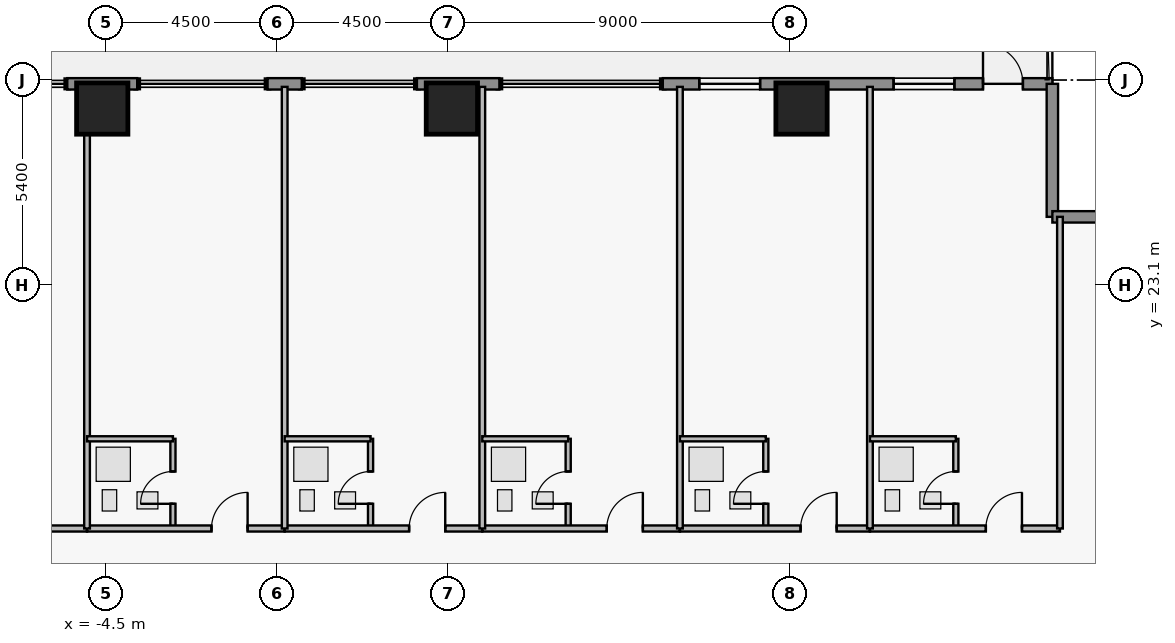
"""IFC4 building model, lengths in metres.
Left out: names, types, materials, properties, quantities, classifications, styles, units other than length and angle.
Written with IfcOpenShell. Run it as: python <this file> out.ifc"""

import sys

from ifc_helpers import new_model, si_unit, direction, frame, frame_2d, origin, origin_2d, place, context, subcontext, project, spatial, rectangle, extrude, element, fill, save


model = new_model("IFC4")
c1 = context("Model", 3, precision=1e-05, world=origin(), true_north=direction((0.0, 1.0)))
c2 = subcontext(c1, "Body", "Model", "MODEL_VIEW")
j1 = project(units=[si_unit("LENGTHUNIT", "METRE"), si_unit("PLANEANGLEUNIT", "RADIAN")], contexts=[c1])
p1 = place(None, origin())
s1 = spatial("IfcSite", under=j1, at=p1, CompositionType="ELEMENT")
p2 = place(p1, origin())
s2 = spatial("IfcBuilding", under=s1, at=p2, CompositionType="ELEMENT")
p3 = place(p2, frame((0.0, 0.0, 110.25)))
s3 = spatial("IfcBuildingStorey", under=s2, at=p3, CompositionType="ELEMENT", Elevation=110.25)
for number, where, z_axis, x_axis in (
    (1, (-4.6, 27.75, 0.0), (0.0, 0.0, 1.0), (1.0, 0.0, 0.0)),
    (2, (4.6, 27.75, 0.0), (0.0, 0.0, 1.0), (1.0, 0.0, 0.0)),
    (3, (13.8, 27.75, 0.0), (0.0, 0.0, 1.0), (1.0, 0.0, 0.0)),
):
    element("IfcColumn", number, at=place(p3, frame(where, z_axis=z_axis, x_axis=x_axis)), inside=s3, PredefinedType="COLUMN", context=c2, shape_type="SweptSolid", body=[
        extrude(rectangle(XDim=1.35, YDim=1.35, at=origin_2d()), origin(), (0.0, 0.0, 1.0), 3.65),
    ])
p4 = place(p3, frame((-5.52, 28.4, 0.0), z_axis=(0.0, 0.0, 1.0), x_axis=(1.0, 0.0, 0.0)))
e4 = element("IfcWall", 4, at=p4, inside=s3, PredefinedType="STANDARD", context=c2, shape_type="SweptSolid", body=[
    extrude(rectangle(XDim=1.84, YDim=0.3, at=frame_2d((0.92, 0.0))), origin(), (0.0, 0.0, 1.0), 3.43),
])
p5 = place(p3, frame((-0.25, 28.4, 0.0), z_axis=(0.0, 0.0, 1.0), x_axis=(1.0, 0.0, 0.0)))
e5 = element("IfcWall", 5, at=p5, inside=s3, PredefinedType="STANDARD", context=c2, shape_type="SweptSolid", body=[
    extrude(rectangle(XDim=0.9, YDim=0.3, at=frame_2d((0.45, 0.0))), origin(), (0.0, 0.0, 1.0), 3.43),
])
p6 = place(p3, frame((3.68, 28.4, 0.0), z_axis=(0.0, 0.0, 1.0), x_axis=(1.0, 0.0, 0.0)))
e6 = element("IfcWall", 6, at=p6, inside=s3, PredefinedType="STANDARD", context=c2, shape_type="SweptSolid", body=[
    extrude(rectangle(XDim=2.17, YDim=0.3, at=frame_2d((1.085, 0.0))), origin(), (0.0, 0.0, 1.0), 3.43),
])
p7 = place(p3, frame((10.15, 28.4, 0.0), z_axis=(0.0, 0.0, 1.0), x_axis=(1.0, 0.0, 0.0)))
e7 = element("IfcWall", 7, at=p7, inside=s3, PredefinedType="STANDARD", context=c2, shape_type="SweptSolid", body=[
    extrude(rectangle(XDim=10.25, YDim=0.3, at=frame_2d((5.125, 0.0))), origin(), (0.0, 0.0, 1.0), 3.43),
])
p8 = place(p7, frame((8.425, 0.0, 0.0)))
e8 = element("IfcOpeningElement", 8, at=p8, cuts=e7, PredefinedType="OPENING", context=c2, shape_type="SweptSolid", body=[
    extrude(rectangle(XDim=1.05, YDim=2.2, at=frame_2d((0.525, 1.1))), frame((0.0, 0.16, 0.0), z_axis=(0.0, -1.0, 0.0), x_axis=(1.0, 0.0, 0.0)), (0.0, 0.0, 1.0), 0.32),
])
p9 = place(p7, frame((0.96, 0.0, 0.85)))
e9 = element("IfcOpeningElement", 9, at=p9, cuts=e7, PredefinedType="OPENING", context=c2, shape_type="SweptSolid", body=[
    extrude(rectangle(XDim=1.6, YDim=1.8, at=frame_2d((0.8, 0.9))), frame((0.0, 0.16, 0.0), z_axis=(0.0, -1.0, 0.0), x_axis=(1.0, 0.0, 0.0)), (0.0, 0.0, 1.0), 0.32),
])
p10 = place(p7, frame((6.073, 0.0, 0.85)))
e10 = element("IfcOpeningElement", 10, at=p10, cuts=e7, PredefinedType="OPENING", context=c2, shape_type="SweptSolid", body=[
    extrude(rectangle(XDim=1.6, YDim=1.8, at=frame_2d((0.8, 0.9))), frame((0.0, 0.16, 0.0), z_axis=(0.0, -1.0, 0.0), x_axis=(1.0, 0.0, 0.0)), (0.0, 0.0, 1.0), 0.32),
])
for number, where, z_axis, x_axis in (
    (11, (20.4, 28.4, 0.0), (0.0, 0.0, 1.0), (0.0, -1.0, 0.0)),
    (12, (20.4, 24.9, 0.0), (0.0, 0.0, 1.0), (1.0, 0.0, 0.0)),
):
    element("IfcWall", number, at=place(p3, frame(where, z_axis=z_axis, x_axis=x_axis)), inside=s3, PredefinedType="STANDARD", context=c2, shape_type="SweptSolid", body=[
        extrude(rectangle(XDim=3.5, YDim=0.3, at=frame_2d((1.75, 0.0))), origin(), (0.0, 0.0, 1.0), 3.43),
    ])
p11 = place(p3, frame((-10.2, 16.7, 0.0), z_axis=(0.0, 0.0, 1.0), x_axis=(1.0, 0.0, 0.0)))
e13 = element("IfcWall", 13, at=p11, inside=s3, PredefinedType="PARTITIONING", context=c2, shape_type="SweptSolid", body=[
    extrude(rectangle(XDim=5.2, YDim=0.16, at=frame_2d((2.6, 0.0))), origin(), (0.0, 0.0, 1.0), 2.973),
])
p12 = place(p11, frame((3.275, 0.0, 0.0)))
e14 = element("IfcOpeningElement", 14, at=p12, cuts=e13, PredefinedType="OPENING", context=c2, shape_type="SweptSolid", body=[
    extrude(rectangle(XDim=0.95, YDim=2.15, at=frame_2d((0.475, 1.075))), frame((0.0, 0.09, 0.0), z_axis=(0.0, -1.0, 0.0), x_axis=(1.0, 0.0, 0.0)), (0.0, 0.0, 1.0), 0.18),
])
p13 = place(p3, frame((-2.74, 16.7, 0.0), z_axis=(0.0, 0.0, 1.0), x_axis=(0.0, 1.0, 0.0)))
e15 = element("IfcWall", 15, at=p13, inside=s3, PredefinedType="PLUMBINGWALL", context=c2, shape_type="SweptSolid", body=[
    extrude(rectangle(XDim=2.36, YDim=0.135, at=frame_2d((1.18, 0.0))), origin(), (0.0, 0.0, 1.0), 3.43),
])
p14 = place(p13, frame((0.65, 0.0, 0.0)))
e16 = element("IfcOpeningElement", 16, at=p14, cuts=e15, PredefinedType="OPENING", context=c2, shape_type="SweptSolid", body=[
    extrude(rectangle(XDim=0.85, YDim=2.1, at=frame_2d((0.425, 1.05))), frame((0.0, 0.077, 0.0), z_axis=(0.0, -1.0, 0.0), x_axis=(1.0, 0.0, 0.0)), (0.0, 0.0, 1.0), 0.155),
])
p15 = place(p3, frame((-5.0, 16.7, 0.0), z_axis=(0.0, 0.0, 1.0), x_axis=(1.0, 0.0, 0.0)))
e17 = element("IfcWall", 17, at=p15, inside=s3, PredefinedType="PARTITIONING", context=c2, shape_type="SweptSolid", body=[
    extrude(rectangle(XDim=5.2, YDim=0.16, at=frame_2d((2.6, 0.0))), origin(), (0.0, 0.0, 1.0), 2.973),
])
p16 = place(p15, frame((3.275, 0.0, 0.0)))
e18 = element("IfcOpeningElement", 18, at=p16, cuts=e17, PredefinedType="OPENING", context=c2, shape_type="SweptSolid", body=[
    extrude(rectangle(XDim=0.95, YDim=2.15, at=frame_2d((0.475, 1.075))), frame((0.0, 0.09, 0.0), z_axis=(0.0, -1.0, 0.0), x_axis=(1.0, 0.0, 0.0)), (0.0, 0.0, 1.0), 0.18),
])
p17 = place(p3, frame((2.46, 16.7, 0.0), z_axis=(0.0, 0.0, 1.0), x_axis=(0.0, 1.0, 0.0)))
e19 = element("IfcWall", 19, at=p17, inside=s3, PredefinedType="PLUMBINGWALL", context=c2, shape_type="SweptSolid", body=[
    extrude(rectangle(XDim=2.36, YDim=0.135, at=frame_2d((1.18, 0.0))), origin(), (0.0, 0.0, 1.0), 3.43),
])
p18 = place(p17, frame((0.65, 0.0, 0.0)))
e20 = element("IfcOpeningElement", 20, at=p18, cuts=e19, PredefinedType="OPENING", context=c2, shape_type="SweptSolid", body=[
    extrude(rectangle(XDim=0.85, YDim=2.1, at=frame_2d((0.425, 1.05))), frame((0.0, 0.077, 0.0), z_axis=(0.0, -1.0, 0.0), x_axis=(1.0, 0.0, 0.0)), (0.0, 0.0, 1.0), 0.155),
])
p19 = place(p3, frame((0.2, 16.7, 0.0), z_axis=(0.0, 0.0, 1.0), x_axis=(1.0, 0.0, 0.0)))
e21 = element("IfcWall", 21, at=p19, inside=s3, PredefinedType="PARTITIONING", context=c2, shape_type="SweptSolid", body=[
    extrude(rectangle(XDim=5.2, YDim=0.16, at=frame_2d((2.6, 0.0))), origin(), (0.0, 0.0, 1.0), 2.973),
])
p20 = place(p19, frame((3.275, 0.0, 0.0)))
e22 = element("IfcOpeningElement", 22, at=p20, cuts=e21, PredefinedType="OPENING", context=c2, shape_type="SweptSolid", body=[
    extrude(rectangle(XDim=0.95, YDim=2.15, at=frame_2d((0.475, 1.075))), frame((0.0, 0.09, 0.0), z_axis=(0.0, -1.0, 0.0), x_axis=(1.0, 0.0, 0.0)), (0.0, 0.0, 1.0), 0.18),
])
p21 = place(p3, frame((7.66, 16.7, 0.0), z_axis=(0.0, 0.0, 1.0), x_axis=(0.0, 1.0, 0.0)))
e23 = element("IfcWall", 23, at=p21, inside=s3, PredefinedType="PLUMBINGWALL", context=c2, shape_type="SweptSolid", body=[
    extrude(rectangle(XDim=2.36, YDim=0.135, at=frame_2d((1.18, 0.0))), origin(), (0.0, 0.0, 1.0), 3.43),
])
p22 = place(p21, frame((0.65, 0.0, 0.0)))
e24 = element("IfcOpeningElement", 24, at=p22, cuts=e23, PredefinedType="OPENING", context=c2, shape_type="SweptSolid", body=[
    extrude(rectangle(XDim=0.85, YDim=2.1, at=frame_2d((0.425, 1.05))), frame((0.0, 0.077, 0.0), z_axis=(0.0, -1.0, 0.0), x_axis=(1.0, 0.0, 0.0)), (0.0, 0.0, 1.0), 0.155),
])
p23 = place(p3, frame((5.4, 16.7, 0.0), z_axis=(0.0, 0.0, 1.0), x_axis=(1.0, 0.0, 0.0)))
e25 = element("IfcWall", 25, at=p23, inside=s3, PredefinedType="PARTITIONING", context=c2, shape_type="SweptSolid", body=[
    extrude(rectangle(XDim=5.2, YDim=0.16, at=frame_2d((2.6, 0.0))), origin(), (0.0, 0.0, 1.0), 2.973),
])
p24 = place(p23, frame((3.275, 0.0, 0.0)))
e26 = element("IfcOpeningElement", 26, at=p24, cuts=e25, PredefinedType="OPENING", context=c2, shape_type="SweptSolid", body=[
    extrude(rectangle(XDim=0.95, YDim=2.15, at=frame_2d((0.475, 1.075))), frame((0.0, 0.09, 0.0), z_axis=(0.0, -1.0, 0.0), x_axis=(1.0, 0.0, 0.0)), (0.0, 0.0, 1.0), 0.18),
])
p25 = place(p3, frame((12.86, 16.7, 0.0), z_axis=(0.0, 0.0, 1.0), x_axis=(0.0, 1.0, 0.0)))
e27 = element("IfcWall", 27, at=p25, inside=s3, PredefinedType="PLUMBINGWALL", context=c2, shape_type="SweptSolid", body=[
    extrude(rectangle(XDim=2.36, YDim=0.135, at=frame_2d((1.18, 0.0))), origin(), (0.0, 0.0, 1.0), 3.43),
])
p26 = place(p25, frame((0.65, 0.0, 0.0)))
e28 = element("IfcOpeningElement", 28, at=p26, cuts=e27, PredefinedType="OPENING", context=c2, shape_type="SweptSolid", body=[
    extrude(rectangle(XDim=0.85, YDim=2.1, at=frame_2d((0.425, 1.05))), frame((0.0, 0.077, 0.0), z_axis=(0.0, -1.0, 0.0), x_axis=(1.0, 0.0, 0.0)), (0.0, 0.0, 1.0), 0.155),
])
p27 = place(p3, frame((10.6, 16.7, 0.0), z_axis=(0.0, 0.0, 1.0), x_axis=(1.0, 0.0, 0.0)))
e29 = element("IfcWall", 29, at=p27, inside=s3, PredefinedType="PARTITIONING", context=c2, shape_type="SweptSolid", body=[
    extrude(rectangle(XDim=5.0, YDim=0.16, at=frame_2d((2.5, 0.0))), origin(), (0.0, 0.0, 1.0), 2.973),
])
p28 = place(p27, frame((3.175, 0.0, 0.0)))
e30 = element("IfcOpeningElement", 30, at=p28, cuts=e29, PredefinedType="OPENING", context=c2, shape_type="SweptSolid", body=[
    extrude(rectangle(XDim=0.95, YDim=2.15, at=frame_2d((0.475, 1.075))), frame((0.0, 0.09, 0.0), z_axis=(0.0, -1.0, 0.0), x_axis=(1.0, 0.0, 0.0)), (0.0, 0.0, 1.0), 0.18),
])
p29 = place(p3, frame((17.86, 16.7, 0.0), z_axis=(0.0, 0.0, 1.0), x_axis=(0.0, 1.0, 0.0)))
e31 = element("IfcWall", 31, at=p29, inside=s3, PredefinedType="PLUMBINGWALL", context=c2, shape_type="SweptSolid", body=[
    extrude(rectangle(XDim=2.36, YDim=0.135, at=frame_2d((1.18, 0.0))), origin(), (0.0, 0.0, 1.0), 3.43),
])
p30 = place(p29, frame((0.65, 0.0, 0.0)))
e32 = element("IfcOpeningElement", 32, at=p30, cuts=e31, PredefinedType="OPENING", context=c2, shape_type="SweptSolid", body=[
    extrude(rectangle(XDim=0.85, YDim=2.1, at=frame_2d((0.425, 1.05))), frame((0.0, 0.077, 0.0), z_axis=(0.0, -1.0, 0.0), x_axis=(1.0, 0.0, 0.0)), (0.0, 0.0, 1.0), 0.155),
])
p31 = place(p3, frame((15.6, 16.7, 0.0), z_axis=(0.0, 0.0, 1.0), x_axis=(1.0, 0.0, 0.0)))
e33 = element("IfcWall", 33, at=p31, inside=s3, PredefinedType="PARTITIONING", context=c2, shape_type="SweptSolid", body=[
    extrude(rectangle(XDim=5.0, YDim=0.16, at=frame_2d((2.5, 0.0))), origin(), (0.0, 0.0, 1.0), 3.43),
])
p32 = place(p31, frame((3.05, 0.0, 0.0)))
e34 = element("IfcOpeningElement", 34, at=p32, cuts=e33, PredefinedType="OPENING", context=c2, shape_type="SweptSolid", body=[
    extrude(rectangle(XDim=0.95, YDim=2.15, at=frame_2d((0.475, 1.075))), frame((0.0, 0.09, 0.0), z_axis=(0.0, -1.0, 0.0), x_axis=(1.0, 0.0, 0.0)), (0.0, 0.0, 1.0), 0.18),
])
p33 = place(p3, frame((-5.0, 16.7, 0.0), z_axis=(0.0, 0.0, 1.0), x_axis=(0.0, 1.0, 0.0)))
e35 = element("IfcWall", 35, at=p33, inside=s3, PredefinedType="PARTITIONING", context=c2, shape_type="SweptSolid", body=[
    extrude(rectangle(XDim=11.62, YDim=0.15, at=frame_2d((5.81, 0.0))), origin(), (0.0, 0.0, 1.0), 2.503),
])
p34 = place(p3, frame((-5.0, 19.06, 0.0), z_axis=(0.0, 0.0, 1.0), x_axis=(1.0, 0.0, 0.0)))
e36 = element("IfcWall", 36, at=p34, inside=s3, PredefinedType="PLUMBINGWALL", context=c2, shape_type="SweptSolid", body=[
    extrude(rectangle(XDim=2.26, YDim=0.135, at=frame_2d((1.13, 0.0))), origin(), (0.0, 0.0, 1.0), 2.973),
])
p35 = place(p3, frame((0.2, 16.7, 0.0), z_axis=(0.0, 0.0, 1.0), x_axis=(0.0, 1.0, 0.0)))
e37 = element("IfcWall", 37, at=p35, inside=s3, PredefinedType="PARTITIONING", context=c2, shape_type="SweptSolid", body=[
    extrude(rectangle(XDim=11.62, YDim=0.15, at=frame_2d((5.81, 0.0))), origin(), (0.0, 0.0, 1.0), 3.43),
])
p36 = place(p3, frame((0.2, 19.06, 0.0), z_axis=(0.0, 0.0, 1.0), x_axis=(1.0, 0.0, 0.0)))
e38 = element("IfcWall", 38, at=p36, inside=s3, PredefinedType="PLUMBINGWALL", context=c2, shape_type="SweptSolid", body=[
    extrude(rectangle(XDim=2.26, YDim=0.135, at=frame_2d((1.13, 0.0))), origin(), (0.0, 0.0, 1.0), 2.973),
])
p37 = place(p3, frame((5.4, 16.7, 0.0), z_axis=(0.0, 0.0, 1.0), x_axis=(0.0, 1.0, 0.0)))
e39 = element("IfcWall", 39, at=p37, inside=s3, PredefinedType="PARTITIONING", context=c2, shape_type="SweptSolid", body=[
    extrude(rectangle(XDim=11.62, YDim=0.15, at=frame_2d((5.81, 0.0))), origin(), (0.0, 0.0, 1.0), 3.43),
])
p38 = place(p3, frame((5.4, 19.06, 0.0), z_axis=(0.0, 0.0, 1.0), x_axis=(1.0, 0.0, 0.0)))
e40 = element("IfcWall", 40, at=p38, inside=s3, PredefinedType="PLUMBINGWALL", context=c2, shape_type="SweptSolid", body=[
    extrude(rectangle(XDim=2.26, YDim=0.135, at=frame_2d((1.13, 0.0))), origin(), (0.0, 0.0, 1.0), 2.973),
])
p39 = place(p3, frame((10.6, 16.7, 0.0), z_axis=(0.0, 0.0, 1.0), x_axis=(0.0, 1.0, 0.0)))
e41 = element("IfcWall", 41, at=p39, inside=s3, PredefinedType="PARTITIONING", context=c2, shape_type="SweptSolid", body=[
    extrude(rectangle(XDim=11.62, YDim=0.15, at=frame_2d((5.81, 0.0))), origin(), (0.0, 0.0, 1.0), 3.43),
])
p40 = place(p3, frame((10.6, 19.06, 0.0), z_axis=(0.0, 0.0, 1.0), x_axis=(1.0, 0.0, 0.0)))
e42 = element("IfcWall", 42, at=p40, inside=s3, PredefinedType="PLUMBINGWALL", context=c2, shape_type="SweptSolid", body=[
    extrude(rectangle(XDim=2.26, YDim=0.135, at=frame_2d((1.13, 0.0))), origin(), (0.0, 0.0, 1.0), 2.973),
])
p41 = place(p3, frame((15.6, 16.7, 0.0), z_axis=(0.0, 0.0, 1.0), x_axis=(0.0, 1.0, 0.0)))
e43 = element("IfcWall", 43, at=p41, inside=s3, PredefinedType="PARTITIONING", context=c2, shape_type="SweptSolid", body=[
    extrude(rectangle(XDim=11.62, YDim=0.15, at=frame_2d((5.81, 0.0))), origin(), (0.0, 0.0, 1.0), 3.43),
])
p42 = place(p3, frame((15.6, 19.06, 0.0), z_axis=(0.0, 0.0, 1.0), x_axis=(1.0, 0.0, 0.0)))
e44 = element("IfcWall", 44, at=p42, inside=s3, PredefinedType="PLUMBINGWALL", context=c2, shape_type="SweptSolid", body=[
    extrude(rectangle(XDim=2.26, YDim=0.135, at=frame_2d((1.13, 0.0))), origin(), (0.0, 0.0, 1.0), 3.43),
])
p43 = place(p3, frame((20.6, 16.7, 0.0), z_axis=(0.0, 0.0, 1.0), x_axis=(0.0, 1.0, 0.0)))
e45 = element("IfcWall", 45, at=p43, inside=s3, PredefinedType="PARTITIONING", context=c2, shape_type="SweptSolid", body=[
    extrude(rectangle(XDim=8.2, YDim=0.15, at=frame_2d((4.1, 0.0))), origin(), (0.0, 0.0, 1.0), 3.43),
])
p44 = place(p8, origin())
e46 = element("IfcDoor", 46, at=p44, inside=s3, OperationType="SINGLE_SWING_LEFT", PredefinedType="DOOR", context=c2, shape_type="SweptSolid", body=[
    extrude(rectangle(XDim=1.05, YDim=2.2, at=frame_2d((0.525, 1.1))), frame((0.0, 0.025, 0.0), z_axis=(0.0, -1.0, 0.0), x_axis=(1.0, 0.0, 0.0)), (0.0, 0.0, 1.0), 0.05),
])
fill(e8, e46)
p45 = place(p9, origin())
e47 = element("IfcWindow", 47, at=p45, inside=s3, PartitioningType="SINGLE_PANEL", PredefinedType="WINDOW", context=c2, shape_type="SweptSolid", body=[
    extrude(rectangle(XDim=1.6, YDim=1.8, at=frame_2d((0.8, 0.9))), frame((0.0, 0.03, 0.0), z_axis=(0.0, -1.0, 0.0), x_axis=(1.0, 0.0, 0.0)), (0.0, 0.0, 1.0), 0.06),
])
fill(e9, e47)
p46 = place(p10, origin())
e48 = element("IfcWindow", 48, at=p46, inside=s3, PartitioningType="SINGLE_PANEL", PredefinedType="WINDOW", context=c2, shape_type="SweptSolid", body=[
    extrude(rectangle(XDim=1.6, YDim=1.8, at=frame_2d((0.8, 0.9))), frame((0.0, 0.03, 0.0), z_axis=(0.0, -1.0, 0.0), x_axis=(1.0, 0.0, 0.0)), (0.0, 0.0, 1.0), 0.06),
])
fill(e10, e48)
p47 = place(p14, origin())
e49 = element("IfcDoor", 49, at=p47, inside=s3, OperationType="SINGLE_SWING_LEFT", PredefinedType="DOOR", context=c2, shape_type="SweptSolid", body=[
    extrude(rectangle(XDim=0.85, YDim=2.1, at=frame_2d((0.425, 1.05))), frame((0.0, 0.025, 0.0), z_axis=(0.0, -1.0, 0.0), x_axis=(1.0, 0.0, 0.0)), (0.0, 0.0, 1.0), 0.05),
])
fill(e16, e49)
p48 = place(p16, origin())
e50 = element("IfcDoor", 50, at=p48, inside=s3, OperationType="SINGLE_SWING_RIGHT", PredefinedType="DOOR", context=c2, shape_type="SweptSolid", body=[
    extrude(rectangle(XDim=0.95, YDim=2.15, at=frame_2d((0.475, 1.075))), frame((0.0, 0.025, 0.0), z_axis=(0.0, -1.0, 0.0), x_axis=(1.0, 0.0, 0.0)), (0.0, 0.0, 1.0), 0.05),
])
fill(e18, e50)
p49 = place(p18, origin())
e51 = element("IfcDoor", 51, at=p49, inside=s3, OperationType="SINGLE_SWING_LEFT", PredefinedType="DOOR", context=c2, shape_type="SweptSolid", body=[
    extrude(rectangle(XDim=0.85, YDim=2.1, at=frame_2d((0.425, 1.05))), frame((0.0, 0.025, 0.0), z_axis=(0.0, -1.0, 0.0), x_axis=(1.0, 0.0, 0.0)), (0.0, 0.0, 1.0), 0.05),
])
fill(e20, e51)
p50 = place(p20, origin())
e52 = element("IfcDoor", 52, at=p50, inside=s3, OperationType="SINGLE_SWING_RIGHT", PredefinedType="DOOR", context=c2, shape_type="SweptSolid", body=[
    extrude(rectangle(XDim=0.95, YDim=2.15, at=frame_2d((0.475, 1.075))), frame((0.0, 0.025, 0.0), z_axis=(0.0, -1.0, 0.0), x_axis=(1.0, 0.0, 0.0)), (0.0, 0.0, 1.0), 0.05),
])
fill(e22, e52)
p51 = place(p22, origin())
e53 = element("IfcDoor", 53, at=p51, inside=s3, OperationType="SINGLE_SWING_LEFT", PredefinedType="DOOR", context=c2, shape_type="SweptSolid", body=[
    extrude(rectangle(XDim=0.85, YDim=2.1, at=frame_2d((0.425, 1.05))), frame((0.0, 0.025, 0.0), z_axis=(0.0, -1.0, 0.0), x_axis=(1.0, 0.0, 0.0)), (0.0, 0.0, 1.0), 0.05),
])
fill(e24, e53)
p52 = place(p24, origin())
e54 = element("IfcDoor", 54, at=p52, inside=s3, OperationType="SINGLE_SWING_RIGHT", PredefinedType="DOOR", context=c2, shape_type="SweptSolid", body=[
    extrude(rectangle(XDim=0.95, YDim=2.15, at=frame_2d((0.475, 1.075))), frame((0.0, 0.025, 0.0), z_axis=(0.0, -1.0, 0.0), x_axis=(1.0, 0.0, 0.0)), (0.0, 0.0, 1.0), 0.05),
])
fill(e26, e54)
p53 = place(p26, origin())
e55 = element("IfcDoor", 55, at=p53, inside=s3, OperationType="SINGLE_SWING_LEFT", PredefinedType="DOOR", context=c2, shape_type="SweptSolid", body=[
    extrude(rectangle(XDim=0.85, YDim=2.1, at=frame_2d((0.425, 1.05))), frame((0.0, 0.025, 0.0), z_axis=(0.0, -1.0, 0.0), x_axis=(1.0, 0.0, 0.0)), (0.0, 0.0, 1.0), 0.05),
])
fill(e28, e55)
p54 = place(p28, origin())
e56 = element("IfcDoor", 56, at=p54, inside=s3, OperationType="SINGLE_SWING_RIGHT", PredefinedType="DOOR", context=c2, shape_type="SweptSolid", body=[
    extrude(rectangle(XDim=0.95, YDim=2.15, at=frame_2d((0.475, 1.075))), frame((0.0, 0.025, 0.0), z_axis=(0.0, -1.0, 0.0), x_axis=(1.0, 0.0, 0.0)), (0.0, 0.0, 1.0), 0.05),
])
fill(e30, e56)
p55 = place(p30, origin())
e57 = element("IfcDoor", 57, at=p55, inside=s3, OperationType="SINGLE_SWING_LEFT", PredefinedType="DOOR", context=c2, shape_type="SweptSolid", body=[
    extrude(rectangle(XDim=0.85, YDim=2.1, at=frame_2d((0.425, 1.05))), frame((0.0, 0.025, 0.0), z_axis=(0.0, -1.0, 0.0), x_axis=(1.0, 0.0, 0.0)), (0.0, 0.0, 1.0), 0.05),
])
fill(e32, e57)
p56 = place(p32, origin())
e58 = element("IfcDoor", 58, at=p56, inside=s3, OperationType="SINGLE_SWING_RIGHT", PredefinedType="DOOR", context=c2, shape_type="SweptSolid", body=[
    extrude(rectangle(XDim=0.95, YDim=2.15, at=frame_2d((0.475, 1.075))), frame((0.0, 0.025, 0.0), z_axis=(0.0, -1.0, 0.0), x_axis=(1.0, 0.0, 0.0)), (0.0, 0.0, 1.0), 0.05),
])
fill(e34, e58)
save(model, sys.argv[1])
